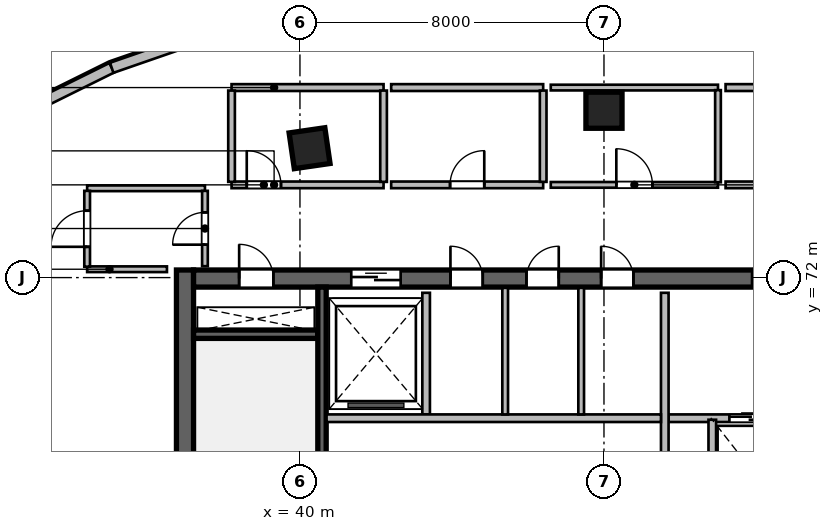
"""IFC4 building model, lengths in metres.
Left out: names, types, materials, properties, quantities, classifications, styles, units other than length and angle.
Written with IfcOpenShell. Run it as: python <this file> out.ifc"""

import sys

from ifc_helpers import new_model, si_unit, direction, frame, frame_2d, origin, origin_2d, place, context, subcontext, project, spatial, rectangle, extrude, source, transform, mapped, element, fill, save


model = new_model("IFC4")
c1 = context("Model", 3, precision=1e-05, world=origin(), true_north=direction((0.0, 1.0)))
c2 = subcontext(c1, "Body", "Model", "MODEL_VIEW")
j1 = project(units=[si_unit("LENGTHUNIT", "METRE"), si_unit("PLANEANGLEUNIT", "RADIAN")], contexts=[c1])
p1 = place(None, origin())
s1 = spatial("IfcSite", under=j1, at=p1, CompositionType="ELEMENT")
p2 = place(p1, origin())
s2 = spatial("IfcBuilding", under=s1, at=p2, CompositionType="ELEMENT")
p3 = place(p2, frame((0.0, 0.0, 211.8)))
s3 = spatial("IfcBuildingStorey", under=s2, at=p3, CompositionType="ELEMENT", Elevation=211.8)
m1 = source(origin(), c2, "Body", "SweptSolid", [
    extrude(rectangle(XDim=12.0, YDim=0.45, at=frame_2d((6.0, 0.0))), origin(), (0.0, 0.0, 1.0), 3.9),
])
p4 = place(p3, frame((36.975, 60.2, 0.0), z_axis=(0.0, 0.0, 1.0), x_axis=(0.0, 1.0, 0.0)))
e1 = element("IfcWall", 1, at=p4, inside=s3, PredefinedType="SHEAR", context=c2, shape_type="MappedRepresentation", body=[
    mapped(m1, transform((0.0, 0.0, 0.0), scale=1.0)),
])
m2 = source(origin(), c2, "Body", "SweptSolid", [
    extrude(rectangle(XDim=21.6, YDim=0.45, at=frame_2d((10.8, 0.0))), origin(), (0.0, 0.0, 1.0), 3.9),
])
p5 = place(p3, frame((37.2, 71.975, 0.0), z_axis=(0.0, 0.0, 1.0), x_axis=(1.0, 0.0, 0.0)))
e2 = element("IfcWall", 2, at=p5, inside=s3, PredefinedType="SHEAR", context=c2, shape_type="MappedRepresentation", body=[
    mapped(m2, transform((0.0, 0.0, 0.0), scale=1.0)),
])
p6 = place(p5, frame((1.2, 0.0, 0.0)))
e3 = element("IfcOpeningElement", 3, at=p6, cuts=e2, PredefinedType="OPENING", context=c2, shape_type="SweptSolid", body=[
    extrude(rectangle(XDim=0.9, YDim=2.1, at=frame_2d((0.45, 1.05))), frame((0.0, 0.235, 0.0), z_axis=(0.0, -1.0, 0.0), x_axis=(1.0, 0.0, 0.0)), (0.0, 0.0, 1.0), 0.47),
])
p7 = place(p5, frame((14.7, 0.0, 0.0)))
e4 = element("IfcOpeningElement", 4, at=p7, cuts=e2, PredefinedType="OPENING", context=c2, shape_type="SweptSolid", body=[
    extrude(rectangle(XDim=1.2, YDim=2.15, at=frame_2d((0.6, 1.075))), frame((0.0, 0.235, 0.0), z_axis=(0.0, -1.0, 0.0), x_axis=(1.0, 0.0, 0.0)), (0.0, 0.0, 1.0), 0.47),
])
p8 = place(p5, frame((4.15, 0.0, 0.0)))
e5 = element("IfcOpeningElement", 5, at=p8, cuts=e2, PredefinedType="OPENING", context=c2, shape_type="SweptSolid", body=[
    extrude(rectangle(XDim=1.3, YDim=2.15, at=frame_2d((0.65, 1.075))), frame((0.0, 0.235, 0.0), z_axis=(0.0, -1.0, 0.0), x_axis=(1.0, 0.0, 0.0)), (0.0, 0.0, 1.0), 0.47),
])
p9 = place(p5, frame((6.76, 0.0, 0.0)))
e6 = element("IfcOpeningElement", 6, at=p9, cuts=e2, PredefinedType="OPENING", context=c2, shape_type="SweptSolid", body=[
    extrude(rectangle(XDim=0.85, YDim=2.1, at=frame_2d((0.425, 1.05))), frame((0.0, 0.235, 0.0), z_axis=(0.0, -1.0, 0.0), x_axis=(1.0, 0.0, 0.0)), (0.0, 0.0, 1.0), 0.47),
])
p10 = place(p5, frame((8.76, 0.0, 0.0)))
e7 = element("IfcOpeningElement", 7, at=p10, cuts=e2, PredefinedType="OPENING", context=c2, shape_type="SweptSolid", body=[
    extrude(rectangle(XDim=0.85, YDim=2.1, at=frame_2d((0.425, 1.05))), frame((0.0, 0.235, 0.0), z_axis=(0.0, -1.0, 0.0), x_axis=(1.0, 0.0, 0.0)), (0.0, 0.0, 1.0), 0.47),
])
p11 = place(p5, frame((10.725, 0.0, 0.0)))
e8 = element("IfcOpeningElement", 8, at=p11, cuts=e2, PredefinedType="OPENING", context=c2, shape_type="SweptSolid", body=[
    extrude(rectangle(XDim=0.85, YDim=2.1, at=frame_2d((0.425, 1.05))), frame((0.0, 0.235, 0.0), z_axis=(0.0, -1.0, 0.0), x_axis=(1.0, 0.0, 0.0)), (0.0, 0.0, 1.0), 0.47),
])
m3 = source(origin(), c2, "Body", "SweptSolid", [
    extrude(rectangle(XDim=3.27, YDim=0.22, at=frame_2d((1.635, 0.0))), origin(), (0.0, 0.0, 1.0), 3.9),
])
p12 = place(p3, frame((37.2, 70.51, 0.0), z_axis=(0.0, 0.0, 1.0), x_axis=(1.0, 0.0, 0.0)))
e9 = element("IfcWall", 9, at=p12, inside=s3, PredefinedType="SHEAR", context=c2, shape_type="MappedRepresentation", body=[
    mapped(m3, transform((0.0, 0.0, 0.0), scale=1.0)),
])
m4 = source(origin(), c2, "Body", "SweptSolid", [
    extrude(rectangle(XDim=11.1, YDim=0.22, at=frame_2d((5.55, 0.0))), origin(), (0.0, 0.0, 1.0), 3.9),
])
p13 = place(p3, frame((40.58, 60.65, 0.0), z_axis=(0.0, 0.0, 1.0), x_axis=(0.0, 1.0, 0.0)))
e10 = element("IfcWall", 10, at=p13, inside=s3, PredefinedType="SHEAR", context=c2, shape_type="MappedRepresentation", body=[
    mapped(m4, transform((0.0, 0.0, 0.0), scale=1.0)),
])
m5 = source(origin(), c2, "Body", "SweptSolid", [
    extrude(rectangle(XDim=0.95, YDim=0.95, at=origin_2d()), origin(), (0.0, 0.0, 1.0), 3.9),
])
for number, where, z_axis, x_axis in (
    (11, (40.253, 75.404, 0.0), (0.0, 0.0, 1.0), (-0.143, 0.99, 0.0)),
    (12, (48.0, 76.404, 0.0), (0.0, 0.0, 1.0), (0.0, 1.0, 0.0)),
):
    element("IfcColumn", number, at=place(p3, frame(where, z_axis=z_axis, x_axis=x_axis)), inside=s3, PredefinedType="COLUMN", context=c2, shape_type="MappedRepresentation", body=[
        mapped(m5, transform((0.0, 0.0, 0.0), scale=1.0)),
    ])
m6 = source(origin(), c2, "Body", "SweptSolid", [
    extrude(rectangle(XDim=4.59, YDim=0.28, at=frame_2d((2.295, 0.0))), origin(), (0.0, 0.0, 1.0), 3.64),
])
p14 = place(p3, frame((30.934, 75.482, 0.0), z_axis=(0.0, 0.0, 1.0), x_axis=(0.895974834987, 0.444104824418, 0.0)))
e13 = element("IfcWall", 13, at=p14, inside=s3, PredefinedType="SOLIDWALL", context=c2, shape_type="MappedRepresentation", body=[
    mapped(m6, transform((0.0, 0.0, 0.0), scale=1.0)),
])
m7 = source(origin(), c2, "Body", "SweptSolid", [
    extrude(rectangle(XDim=4.492, YDim=0.28, at=frame_2d((2.246, 0.0))), origin(), (0.0, 0.0, 1.0), 3.64),
])
p15 = place(p3, frame((35.046, 77.52, 0.0), z_axis=(0.0, 0.0, 1.0), x_axis=(0.944872297412, 0.32743906545, 0.0)))
e14 = element("IfcWall", 14, at=p15, inside=s3, PredefinedType="SOLIDWALL", context=c2, shape_type="MappedRepresentation", body=[
    mapped(m7, transform((0.0, 0.0, 0.0), scale=1.0)),
])
m8 = source(origin(), c2, "Body", "SweptSolid", [
    extrude(rectangle(XDim=5.62, YDim=0.2, at=frame_2d((2.81, 0.0))), origin(), (0.0, 0.0, 1.0), 3.64),
])
p16 = place(p3, frame((49.7, 68.3, 0.0), z_axis=(0.0, 0.0, 1.0), x_axis=(1.0, 0.0, 0.0)))
e15 = element("IfcWall", 15, at=p16, inside=s3, PredefinedType="SOLIDWALL", context=c2, shape_type="MappedRepresentation", body=[
    mapped(m8, transform((0.0, 0.0, 0.0), scale=1.0)),
])
p17 = place(p16, frame((1.6, 0.0, 0.0)))
e16 = element("IfcOpeningElement", 16, at=p17, cuts=e15, PredefinedType="OPENING", context=c2, shape_type="SweptSolid", body=[
    extrude(rectangle(XDim=1.1, YDim=2.15, at=frame_2d((0.55, 1.075))), frame((0.0, 0.11, 0.0), z_axis=(0.0, -1.0, 0.0), x_axis=(1.0, 0.0, 0.0)), (0.0, 0.0, 1.0), 0.22),
])
p18 = place(p16, frame((3.7, 0.0, 0.0)))
e17 = element("IfcOpeningElement", 17, at=p18, cuts=e15, PredefinedType="OPENING", context=c2, shape_type="SweptSolid", body=[
    extrude(rectangle(XDim=1.1, YDim=2.15, at=frame_2d((0.55, 1.075))), frame((0.0, 0.11, 0.0), z_axis=(0.0, -1.0, 0.0), x_axis=(1.0, 0.0, 0.0)), (0.0, 0.0, 1.0), 0.22),
])
m9 = source(origin(), c2, "Body", "SweptSolid", [
    extrude(rectangle(XDim=5.8, YDim=0.2, at=frame_2d((2.9, 0.0))), origin(), (0.0, 0.0, 1.0), 3.64),
])
p19 = place(p3, frame((49.6, 65.8, 0.0), z_axis=(0.0, 0.0, 1.0), x_axis=(0.0, 1.0, 0.0)))
e18 = element("IfcWall", 18, at=p19, inside=s3, PredefinedType="SOLIDWALL", context=c2, shape_type="MappedRepresentation", body=[
    mapped(m9, transform((0.0, 0.0, 0.0), scale=1.0)),
])
m10 = source(origin(), c2, "Body", "SweptSolid", [
    extrude(rectangle(XDim=2.58, YDim=0.2, at=frame_2d((1.29, 0.0))), origin(), (0.0, 0.0, 1.0), 3.64),
])
p20 = place(p3, frame((50.85, 65.68, 0.0), z_axis=(0.0, 0.0, 1.0), x_axis=(0.0, 1.0, 0.0)))
e19 = element("IfcWall", 19, at=p20, inside=s3, PredefinedType="SOLIDWALL", context=c2, shape_type="MappedRepresentation", body=[
    mapped(m10, transform((0.0, 0.0, 0.0), scale=1.0)),
])
m11 = source(origin(), c2, "Body", "SweptSolid", [
    extrude(rectangle(XDim=3.2, YDim=0.2, at=frame_2d((1.6, 0.0))), origin(), (0.0, 0.0, 1.0), 3.64),
])
p21 = place(p3, frame((43.32, 68.4, 0.0), z_axis=(0.0, 0.0, 1.0), x_axis=(0.0, 1.0, 0.0)))
e20 = element("IfcWall", 20, at=p21, inside=s3, PredefinedType="SOLIDWALL", context=c2, shape_type="MappedRepresentation", body=[
    mapped(m11, transform((0.0, 0.0, 0.0), scale=1.0)),
])
m12 = source(origin(), c2, "Body", "SweptSolid", [
    extrude(rectangle(XDim=8.8, YDim=0.2, at=frame_2d((4.4, 0.0))), origin(), (0.0, 0.0, 1.0), 3.64),
])
p22 = place(p3, frame((40.7, 68.3, 0.0), z_axis=(0.0, 0.0, 1.0), x_axis=(1.0, 0.0, 0.0)))
e21 = element("IfcWall", 21, at=p22, inside=s3, PredefinedType="SOLIDWALL", context=c2, shape_type="MappedRepresentation", body=[
    mapped(m12, transform((0.0, 0.0, 0.0), scale=1.0)),
])
m13 = source(origin(), c2, "Body", "SweptSolid", [
    extrude(rectangle(XDim=3.33, YDim=0.15, at=frame_2d((1.665, 0.0))), origin(), (0.0, 0.0, 1.0), 3.64),
])
for number, where, z_axis, x_axis in (
    (22, (45.4, 68.4, 0.0), (0.0, 0.0, 1.0), (0.0, 1.0, 0.0)),
    (23, (47.4, 68.4, 0.0), (0.0, 0.0, 1.0), (0.0, 1.0, 0.0)),
):
    element("IfcWall", number, at=place(p3, frame(where, z_axis=z_axis, x_axis=x_axis)), inside=s3, PredefinedType="PARTITIONING", context=c2, shape_type="MappedRepresentation", body=[
        mapped(m13, transform((0.0, 0.0, 0.0), scale=1.0)),
    ])
m14 = source(origin(), c2, "Body", "SweptSolid", [
    extrude(rectangle(XDim=2.1, YDim=0.15, at=frame_2d((1.05, 0.0))), origin(), (0.0, 0.0, 1.0), 3.64),
])
p23 = place(p3, frame((34.4, 72.22, 0.0), z_axis=(0.0, 0.0, 1.0), x_axis=(1.0, 0.0, 0.0)))
e24 = element("IfcWall", 24, at=p23, inside=s3, PredefinedType="PARTITIONING", context=c2, shape_type="MappedRepresentation", body=[
    mapped(m14, transform((0.0, 0.0, 0.0), scale=1.0)),
])
m15 = source(origin(), c2, "Body", "SweptSolid", [
    extrude(rectangle(XDim=3.1, YDim=0.15, at=frame_2d((1.55, 0.0))), origin(), (0.0, 0.0, 1.0), 3.071),
])
p24 = place(p3, frame((34.4, 74.35, 0.0), z_axis=(0.0, 0.0, 1.0), x_axis=(1.0, 0.0, 0.0)))
e25 = element("IfcWall", 25, at=p24, inside=s3, PredefinedType="PARTITIONING", context=c2, shape_type="MappedRepresentation", body=[
    mapped(m15, transform((0.0, 0.0, 0.0), scale=1.0)),
])
m16 = source(origin(), c2, "Body", "SweptSolid", [
    extrude(rectangle(XDim=1.995, YDim=0.15, at=frame_2d((0.998, 0.0))), origin(), (0.0, 0.0, 1.0), 3.64),
])
p25 = place(p3, frame((34.4, 72.288, 0.0), z_axis=(0.0, 0.0, 1.0), x_axis=(0.0, 1.0, 0.0)))
e26 = element("IfcWall", 26, at=p25, inside=s3, PredefinedType="PARTITIONING", context=c2, shape_type="MappedRepresentation", body=[
    mapped(m16, transform((0.0, 0.0, 0.0), scale=1.0)),
])
p26 = place(p25, frame((0.522, 0.0, 0.0)))
e27 = element("IfcOpeningElement", 27, at=p26, cuts=e26, PredefinedType="OPENING", context=c2, shape_type="SweptSolid", body=[
    extrude(rectangle(XDim=0.95, YDim=2.1, at=frame_2d((0.475, 1.05))), frame((0.0, 0.085, 0.0), z_axis=(0.0, -1.0, 0.0), x_axis=(1.0, 0.0, 0.0)), (0.0, 0.0, 1.0), 0.17),
])
m17 = source(origin(), c2, "Body", "SweptSolid", [
    extrude(rectangle(XDim=1.982, YDim=0.15, at=frame_2d((0.991, 0.0))), origin(), (0.0, 0.0, 1.0), 3.64),
])
p27 = place(p3, frame((37.5, 72.3, 0.0), z_axis=(0.0, 0.0, 1.0), x_axis=(0.0, 1.0, 0.0)))
e28 = element("IfcWall", 28, at=p27, inside=s3, PredefinedType="PARTITIONING", context=c2, shape_type="MappedRepresentation", body=[
    mapped(m17, transform((0.0, 0.0, 0.0), scale=1.0)),
])
p28 = place(p27, frame((0.566, 0.0, 0.0)))
e29 = element("IfcOpeningElement", 29, at=p28, cuts=e28, PredefinedType="OPENING", context=c2, shape_type="SweptSolid", body=[
    extrude(rectangle(XDim=0.85, YDim=2.1, at=frame_2d((0.425, 1.05))), frame((0.0, 0.085, 0.0), z_axis=(0.0, -1.0, 0.0), x_axis=(1.0, 0.0, 0.0)), (0.0, 0.0, 1.0), 0.17),
])
m18 = source(origin(), c2, "Body", "SweptSolid", [
    extrude(rectangle(XDim=4.0, YDim=0.175, at=frame_2d((2.0, 0.0))), origin(), (0.0, 0.0, 1.0), 3.64),
])
p29 = place(p3, frame((38.2, 74.44, 0.0), z_axis=(0.0, 0.0, 1.0), x_axis=(1.0, 0.0, 0.0)))
e30 = element("IfcWall", 30, at=p29, inside=s3, PredefinedType="PARTITIONING", context=c2, shape_type="MappedRepresentation", body=[
    mapped(m18, transform((0.0, 0.0, 0.0), scale=1.0)),
])
p30 = place(p29, frame((0.4, 0.0, 0.0)))
e31 = element("IfcOpeningElement", 31, at=p30, cuts=e30, PredefinedType="OPENING", context=c2, shape_type="SweptSolid", body=[
    extrude(rectangle(XDim=0.9, YDim=2.08, at=frame_2d((0.45, 1.04))), frame((0.0, 0.098, 0.0), z_axis=(0.0, -1.0, 0.0), x_axis=(1.0, 0.0, 0.0)), (0.0, 0.0, 1.0), 0.195),
])
m19 = source(origin(), c2, "Body", "SweptSolid", [
    extrude(rectangle(XDim=4.0, YDim=0.18, at=frame_2d((2.0, 0.0))), origin(), (0.0, 0.0, 1.0), 3.64),
])
p31 = place(p3, frame((38.2, 77.0, 0.0), z_axis=(0.0, 0.0, 1.0), x_axis=(1.0, 0.0, 0.0)))
e32 = element("IfcWall", 32, at=p31, inside=s3, PredefinedType="PLUMBINGWALL", context=c2, shape_type="MappedRepresentation", body=[
    mapped(m19, transform((0.0, 0.0, 0.0), scale=1.0)),
])
m20 = source(origin(), c2, "Body", "SweptSolid", [
    extrude(rectangle(XDim=2.403, YDim=0.175, at=frame_2d((1.201, 0.0))), origin(), (0.0, 0.0, 1.0), 3.64),
])
for number, where, z_axis, x_axis in (
    (33, (38.2, 74.519, 0.0), (0.0, 0.0, 1.0), (0.0, 1.0, 0.0)),
    (34, (42.2, 74.519, 0.0), (0.0, 0.0, 1.0), (0.0, 1.0, 0.0)),
):
    element("IfcWall", number, at=place(p3, frame(where, z_axis=z_axis, x_axis=x_axis)), inside=s3, PredefinedType="PARTITIONING", context=c2, shape_type="MappedRepresentation", body=[
        mapped(m20, transform((0.0, 0.0, 0.0), scale=1.0)),
    ])
p32 = place(p3, frame((42.4, 74.44, 0.0), z_axis=(0.0, 0.0, 1.0), x_axis=(1.0, 0.0, 0.0)))
e35 = element("IfcWall", 35, at=p32, inside=s3, PredefinedType="PARTITIONING", context=c2, shape_type="MappedRepresentation", body=[
    mapped(m18, transform((0.0, 0.0, 0.0), scale=1.0)),
])
p33 = place(p32, frame((1.55, 0.0, 0.0)))
e36 = element("IfcOpeningElement", 36, at=p33, cuts=e35, PredefinedType="OPENING", context=c2, shape_type="SweptSolid", body=[
    extrude(rectangle(XDim=0.9, YDim=2.08, at=frame_2d((0.45, 1.04))), frame((0.0, 0.098, 0.0), z_axis=(0.0, -1.0, 0.0), x_axis=(1.0, 0.0, 0.0)), (0.0, 0.0, 1.0), 0.195),
])
p34 = place(p3, frame((42.4, 77.0, 0.0), z_axis=(0.0, 0.0, 1.0), x_axis=(1.0, 0.0, 0.0)))
e37 = element("IfcWall", 37, at=p34, inside=s3, PredefinedType="PLUMBINGWALL", context=c2, shape_type="MappedRepresentation", body=[
    mapped(m19, transform((0.0, 0.0, 0.0), scale=1.0)),
])
p35 = place(p3, frame((46.4, 74.519, 0.0), z_axis=(0.0, 0.0, 1.0), x_axis=(0.0, 1.0, 0.0)))
e38 = element("IfcWall", 38, at=p35, inside=s3, PredefinedType="PARTITIONING", context=c2, shape_type="MappedRepresentation", body=[
    mapped(m20, transform((0.0, 0.0, 0.0), scale=1.0)),
])
m21 = source(origin(), c2, "Body", "SweptSolid", [
    extrude(rectangle(XDim=4.4, YDim=0.15, at=frame_2d((2.2, 0.0))), origin(), (0.0, 0.0, 1.0), 3.64),
])
p36 = place(p3, frame((46.6, 74.44, 0.0), z_axis=(0.0, 0.0, 1.0), x_axis=(1.0, 0.0, 0.0)))
e39 = element("IfcWall", 39, at=p36, inside=s3, PredefinedType="PARTITIONING", context=c2, shape_type="MappedRepresentation", body=[
    mapped(m21, transform((0.0, 0.0, 0.0), scale=1.0)),
])
p37 = place(p36, frame((1.725, 0.0, 0.0)))
e40 = element("IfcOpeningElement", 40, at=p37, cuts=e39, PredefinedType="OPENING", context=c2, shape_type="SweptSolid", body=[
    extrude(rectangle(XDim=0.95, YDim=2.1, at=frame_2d((0.475, 1.05))), frame((0.0, 0.085, 0.0), z_axis=(0.0, -1.0, 0.0), x_axis=(1.0, 0.0, 0.0)), (0.0, 0.0, 1.0), 0.17),
])
p38 = place(p3, frame((46.6, 77.0, 0.0), z_axis=(0.0, 0.0, 1.0), x_axis=(1.0, 0.0, 0.0)))
e41 = element("IfcWall", 41, at=p38, inside=s3, PredefinedType="PARTITIONING", context=c2, shape_type="MappedRepresentation", body=[
    mapped(m21, transform((0.0, 0.0, 0.0), scale=1.0)),
])
m22 = source(origin(), c2, "Body", "SweptSolid", [
    extrude(rectangle(XDim=2.425, YDim=0.15, at=frame_2d((1.212, 0.0))), origin(), (0.0, 0.0, 1.0), 3.64),
])
p39 = place(p3, frame((51.0, 74.508, 0.0), z_axis=(0.0, 0.0, 1.0), x_axis=(0.0, 1.0, 0.0)))
e42 = element("IfcWall", 42, at=p39, inside=s3, PredefinedType="PARTITIONING", context=c2, shape_type="MappedRepresentation", body=[
    mapped(m22, transform((0.0, 0.0, 0.0), scale=1.0)),
])
m23 = source(origin(), c2, "Body", "SweptSolid", [
    extrude(rectangle(XDim=4.2, YDim=0.175, at=frame_2d((2.1, 0.0))), origin(), (0.0, 0.0, 1.0), 3.64),
])
p40 = place(p3, frame((51.2, 74.44, 0.0), z_axis=(0.0, 0.0, 1.0), x_axis=(1.0, 0.0, 0.0)))
e43 = element("IfcWall", 43, at=p40, inside=s3, PredefinedType="PARTITIONING", context=c2, shape_type="MappedRepresentation", body=[
    mapped(m23, transform((0.0, 0.0, 0.0), scale=1.0)),
])
p41 = place(p40, frame((1.625, 0.0, 0.0)))
e44 = element("IfcOpeningElement", 44, at=p41, cuts=e43, PredefinedType="OPENING", context=c2, shape_type="SweptSolid", body=[
    extrude(rectangle(XDim=0.95, YDim=2.12, at=frame_2d((0.475, 1.06))), frame((0.0, 0.098, 0.0), z_axis=(0.0, -1.0, 0.0), x_axis=(1.0, 0.0, 0.0)), (0.0, 0.0, 1.0), 0.195),
])
m24 = source(origin(), c2, "Body", "SweptSolid", [
    extrude(rectangle(XDim=4.2, YDim=0.18, at=frame_2d((2.1, 0.0))), origin(), (0.0, 0.0, 1.0), 3.64),
])
p42 = place(p3, frame((51.2, 77.0, 0.0), z_axis=(0.0, 0.0, 1.0), x_axis=(1.0, 0.0, 0.0)))
e45 = element("IfcWall", 45, at=p42, inside=s3, PredefinedType="PLUMBINGWALL", context=c2, shape_type="MappedRepresentation", body=[
    mapped(m24, transform((0.0, 0.0, 0.0), scale=1.0)),
])
m25 = source(origin(), c2, "Body", "SweptSolid", [
    extrude(rectangle(XDim=0.9, YDim=2.1, at=frame_2d((0.45, 1.05))), frame((0.0, 0.025, 0.0), z_axis=(0.0, -1.0, 0.0), x_axis=(1.0, 0.0, 0.0)), (0.0, 0.0, 1.0), 0.05),
])
p43 = place(p6, origin())
e46 = element("IfcDoor", 46, at=p43, inside=s3, OperationType="SINGLE_SWING_LEFT", PredefinedType="DOOR", context=c2, shape_type="MappedRepresentation", body=[
    mapped(m25, transform((0.0, 0.0, 0.0), scale=1.0)),
])
fill(e3, e46)
m26 = source(origin(), c2, "Body", "SweptSolid", [
    extrude(rectangle(XDim=1.2, YDim=2.15, at=frame_2d((0.6, 1.075))), frame((0.0, 0.025, 0.0), z_axis=(0.0, -1.0, 0.0), x_axis=(1.0, 0.0, 0.0)), (0.0, 0.0, 1.0), 0.05),
])
p44 = place(p7, origin())
e47 = element("IfcDoor", 47, at=p44, inside=s3, OperationType="SINGLE_SWING_RIGHT", PredefinedType="DOOR", context=c2, shape_type="MappedRepresentation", body=[
    mapped(m26, transform((0.0, 0.0, 0.0), scale=1.0)),
])
fill(e4, e47)
m27 = source(origin(), c2, "Body", "SweptSolid", [
    extrude(rectangle(XDim=1.1, YDim=2.15, at=frame_2d((0.55, 1.075))), frame((0.0, 0.025, 0.0), z_axis=(0.0, -1.0, 0.0), x_axis=(1.0, 0.0, 0.0)), (0.0, 0.0, 1.0), 0.05),
])
p45 = place(p17, origin())
e48 = element("IfcDoor", 48, at=p45, inside=s3, OperationType="DOUBLE_DOOR_SLIDING", PredefinedType="DOOR", context=c2, shape_type="MappedRepresentation", body=[
    mapped(m27, transform((0.0, 0.0, 0.0), scale=1.0)),
])
fill(e16, e48)
m28 = source(origin(), c2, "Body", "SweptSolid", [
    extrude(rectangle(XDim=1.3, YDim=2.15, at=frame_2d((0.65, 1.075))), frame((0.0, 0.025, 0.0), z_axis=(0.0, -1.0, 0.0), x_axis=(1.0, 0.0, 0.0)), (0.0, 0.0, 1.0), 0.05),
])
p46 = place(p8, origin())
e49 = element("IfcDoor", 49, at=p46, inside=s3, OperationType="DOUBLE_DOOR_SLIDING", PredefinedType="DOOR", context=c2, shape_type="MappedRepresentation", body=[
    mapped(m28, transform((0.0, 0.0, 0.0), scale=1.0)),
])
fill(e5, e49)
m29 = source(origin(), c2, "Body", "SweptSolid", [
    extrude(rectangle(XDim=0.85, YDim=2.1, at=frame_2d((0.425, 1.05))), frame((0.0, 0.025, 0.0), z_axis=(0.0, -1.0, 0.0), x_axis=(1.0, 0.0, 0.0)), (0.0, 0.0, 1.0), 0.05),
])
p47 = place(p9, origin())
e50 = element("IfcDoor", 50, at=p47, inside=s3, OperationType="SINGLE_SWING_LEFT", PredefinedType="DOOR", context=c2, shape_type="MappedRepresentation", body=[
    mapped(m29, transform((0.0, 0.0, 0.0), scale=1.0)),
])
fill(e6, e50)
p48 = place(p10, origin())
e51 = element("IfcDoor", 51, at=p48, inside=s3, OperationType="SINGLE_SWING_RIGHT", PredefinedType="DOOR", context=c2, shape_type="MappedRepresentation", body=[
    mapped(m29, transform((0.0, 0.0, 0.0), scale=1.0)),
])
fill(e7, e51)
p49 = place(p11, origin())
e52 = element("IfcDoor", 52, at=p49, inside=s3, OperationType="SINGLE_SWING_LEFT", PredefinedType="DOOR", context=c2, shape_type="MappedRepresentation", body=[
    mapped(m29, transform((0.0, 0.0, 0.0), scale=1.0)),
])
fill(e8, e52)
p50 = place(p28, origin())
e53 = element("IfcDoor", 53, at=p50, inside=s3, OperationType="SINGLE_SWING_LEFT", PredefinedType="DOOR", context=c2, shape_type="MappedRepresentation", body=[
    mapped(m29, transform((0.0, 0.0, 0.0), scale=1.0)),
])
fill(e29, e53)
m30 = source(origin(), c2, "Body", "SweptSolid", [
    extrude(rectangle(XDim=0.9, YDim=2.08, at=frame_2d((0.45, 1.04))), frame((0.0, 0.025, 0.0), z_axis=(0.0, -1.0, 0.0), x_axis=(1.0, 0.0, 0.0)), (0.0, 0.0, 1.0), 0.05),
])
p51 = place(p30, origin())
e54 = element("IfcDoor", 54, at=p51, inside=s3, OperationType="SINGLE_SWING_LEFT", PredefinedType="DOOR", context=c2, shape_type="MappedRepresentation", body=[
    mapped(m30, transform((0.0, 0.0, 0.0), scale=1.0)),
])
fill(e31, e54)
p52 = place(p33, origin())
e55 = element("IfcDoor", 55, at=p52, inside=s3, OperationType="SINGLE_SWING_RIGHT", PredefinedType="DOOR", context=c2, shape_type="MappedRepresentation", body=[
    mapped(m30, transform((0.0, 0.0, 0.0), scale=1.0)),
])
fill(e36, e55)
m31 = source(origin(), c2, "Body", "SweptSolid", [
    extrude(rectangle(XDim=0.95, YDim=2.1, at=frame_2d((0.475, 1.05))), frame((0.0, 0.025, 0.0), z_axis=(0.0, -1.0, 0.0), x_axis=(1.0, 0.0, 0.0)), (0.0, 0.0, 1.0), 0.05),
])
p53 = place(p37, origin())
e56 = element("IfcDoor", 56, at=p53, inside=s3, OperationType="SINGLE_SWING_LEFT", PredefinedType="DOOR", context=c2, shape_type="MappedRepresentation", body=[
    mapped(m31, transform((0.0, 0.0, 0.0), scale=1.0)),
])
fill(e40, e56)
p54 = place(p26, origin())
e57 = element("IfcDoor", 57, at=p54, inside=s3, OperationType="SINGLE_SWING_LEFT", PredefinedType="DOOR", context=c2, shape_type="MappedRepresentation", body=[
    mapped(m31, transform((0.0, 0.0, 0.0), scale=1.0)),
])
fill(e27, e57)
save(model, sys.argv[1])
